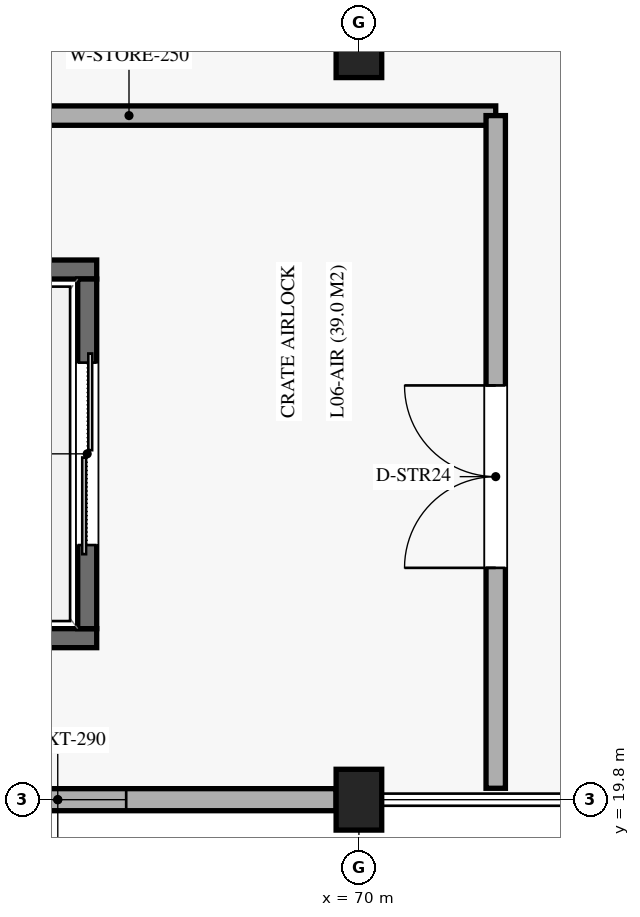
"""IFC4 building model, lengths in metres.
Left out: names, types, materials, properties, quantities, classifications, styles, units other than length and angle.
Written with IfcOpenShell. Run it as: python <this file> out.ifc"""

import sys

from ifc_helpers import new_model, si_unit, direction, frame, frame_2d, origin, origin_2d, place, context, subcontext, project, spatial, rectangle, extrude, element, fill, save


model = new_model("IFC4")
c1 = context("Model", 3, precision=1e-05, world=origin(), true_north=direction((0.0, 1.0)))
c2 = subcontext(c1, "Body", "Model", "MODEL_VIEW")
j1 = project(units=[si_unit("LENGTHUNIT", "METRE"), si_unit("PLANEANGLEUNIT", "RADIAN")], contexts=[c1])
p1 = place(None, origin())
s1 = spatial("IfcSite", under=j1, at=p1, CompositionType="ELEMENT")
p2 = place(p1, origin())
s2 = spatial("IfcBuilding", under=s1, at=p2, CompositionType="ELEMENT")
p3 = place(p2, frame((0.0, 0.0, 33.15)))
s3 = spatial("IfcBuildingStorey", under=s2, at=p3, CompositionType="ELEMENT", Elevation=33.15)
for number, where, z_axis, x_axis in (
    (1, (70.0, 19.8, 0.0), (0.0, 0.0, 1.0), (1.0, 0.0, 0.0)),
    (2, (70.0, 29.7, 0.0), (0.0, 0.0, 1.0), (1.0, 0.0, 0.0)),
):
    element("IfcColumn", number, at=place(p3, frame(where, z_axis=z_axis, x_axis=x_axis)), inside=s3, PredefinedType="COLUMN", context=c2, shape_type="SweptSolid", body=[
        extrude(rectangle(XDim=0.6, YDim=0.8, at=origin_2d()), origin(), (0.0, 0.0, 1.0), 4.59),
    ])
p4 = place(p3, frame((62.375, 19.8, 0.0), z_axis=(0.0, 0.0, 1.0), x_axis=(1.0, 0.0, 0.0)))
e3 = element("IfcWall", 3, at=p4, inside=s3, PredefinedType="SOLIDWALL", context=c2, shape_type="SweptSolid", body=[
    extrude(rectangle(XDim=7.325, YDim=0.29, at=frame_2d((3.663, 0.0))), origin(), (0.0, 0.0, 1.0), 3.57),
])
p5 = place(p4, frame((2.763, 0.0, 1.05)))
e4 = element("IfcOpeningElement", 4, at=p5, cuts=e3, PredefinedType="OPENING", context=c2, shape_type="SweptSolid", body=[
    extrude(rectangle(XDim=1.8, YDim=1.7, at=frame_2d((0.9, 0.85))), frame((0.0, 0.155, 0.0), z_axis=(0.0, -1.0, 0.0), x_axis=(1.0, 0.0, 0.0)), (0.0, 0.0, 1.0), 0.31),
])
for number, where, z_axis, x_axis in (
    (5, (62.65, 21.925, 0.0), (0.0, 0.0, 1.0), (1.0, 0.0, 0.0)),
    (6, (62.65, 26.775, 0.0), (0.0, 0.0, 1.0), (1.0, 0.0, 0.0)),
):
    element("IfcWall", number, at=place(p3, frame(where, z_axis=z_axis, x_axis=x_axis)), inside=s3, PredefinedType="SOLIDWALL", context=c2, shape_type="SweptSolid", body=[
        extrude(rectangle(XDim=3.9, YDim=0.25, at=frame_2d((1.95, 0.0))), origin(), (0.0, 0.0, 1.0), 4.33),
    ])
p6 = place(p3, frame((66.425, 22.05, 0.0), z_axis=(0.0, 0.0, 1.0), x_axis=(0.0, 1.0, 0.0)))
e7 = element("IfcWall", 7, at=p6, inside=s3, PredefinedType="SOLIDWALL", context=c2, shape_type="SweptSolid", body=[
    extrude(rectangle(XDim=4.6, YDim=0.25, at=frame_2d((2.3, 0.0))), origin(), (0.0, 0.0, 1.0), 4.33),
])
p7 = place(p6, frame((1.1, 0.0, 0.0)))
e8 = element("IfcOpeningElement", 8, at=p7, cuts=e7, PredefinedType="OPENING", context=c2, shape_type="SweptSolid", body=[
    extrude(rectangle(XDim=2.4, YDim=2.65, at=frame_2d((1.2, 1.325))), frame((0.0, 0.135, 0.0), z_axis=(0.0, -1.0, 0.0), x_axis=(1.0, 0.0, 0.0)), (0.0, 0.0, 1.0), 0.27),
])
p8 = place(p3, frame((62.15, 28.8, 0.0), z_axis=(0.0, 0.0, 1.0), x_axis=(1.0, 0.0, 0.0)))
e9 = element("IfcWall", 9, at=p8, inside=s3, PredefinedType="SOLIDWALL", context=c2, shape_type="SweptSolid", body=[
    extrude(rectangle(XDim=9.65, YDim=0.255, at=frame_2d((4.825, 0.0))), origin(), (0.0, 0.0, 1.0), 3.47),
])
p9 = place(p3, frame((71.8, 19.95, 0.0), z_axis=(0.0, 0.0, 1.0), x_axis=(0.0, 1.0, 0.0)))
e10 = element("IfcWall", 10, at=p9, inside=s3, PredefinedType="SOLIDWALL", context=c2, shape_type="SweptSolid", body=[
    extrude(rectangle(XDim=8.85, YDim=0.255, at=frame_2d((4.425, 0.0))), origin(), (0.0, 0.0, 1.0), 3.47),
])
p10 = place(p9, frame((2.9, 0.0, 0.0)))
e11 = element("IfcOpeningElement", 11, at=p10, cuts=e10, PredefinedType="OPENING", context=c2, shape_type="SweptSolid", body=[
    extrude(rectangle(XDim=2.4, YDim=2.5, at=frame_2d((1.2, 1.25))), frame((0.0, 0.137, 0.0), z_axis=(0.0, -1.0, 0.0), x_axis=(1.0, 0.0, 0.0)), (0.0, 0.0, 1.0), 0.275),
])
p11 = place(p5, origin())
e12 = element("IfcWindow", 12, at=p11, inside=s3, PartitioningType="SINGLE_PANEL", PredefinedType="WINDOW", context=c2, shape_type="SweptSolid", body=[
    extrude(rectangle(XDim=1.8, YDim=1.7, at=frame_2d((0.9, 0.85))), frame((0.0, 0.03, 0.0), z_axis=(0.0, -1.0, 0.0), x_axis=(1.0, 0.0, 0.0)), (0.0, 0.0, 1.0), 0.06),
])
fill(e4, e12)
p12 = place(p7, origin())
e13 = element("IfcDoor", 13, at=p12, inside=s3, OperationType="DOUBLE_DOOR_SLIDING", PredefinedType="DOOR", context=c2, shape_type="SweptSolid", body=[
    extrude(rectangle(XDim=2.4, YDim=2.65, at=frame_2d((1.2, 1.325))), frame((0.0, 0.025, 0.0), z_axis=(0.0, -1.0, 0.0), x_axis=(1.0, 0.0, 0.0)), (0.0, 0.0, 1.0), 0.05),
])
fill(e8, e13)
p13 = place(p10, origin())
e14 = element("IfcDoor", 14, at=p13, inside=s3, OperationType="DOUBLE_DOOR_SINGLE_SWING", PredefinedType="DOOR", context=c2, shape_type="SweptSolid", body=[
    extrude(rectangle(XDim=2.4, YDim=2.5, at=frame_2d((1.2, 1.25))), frame((0.0, 0.025, 0.0), z_axis=(0.0, -1.0, 0.0), x_axis=(1.0, 0.0, 0.0)), (0.0, 0.0, 1.0), 0.05),
])
fill(e11, e14)
save(model, sys.argv[1])
